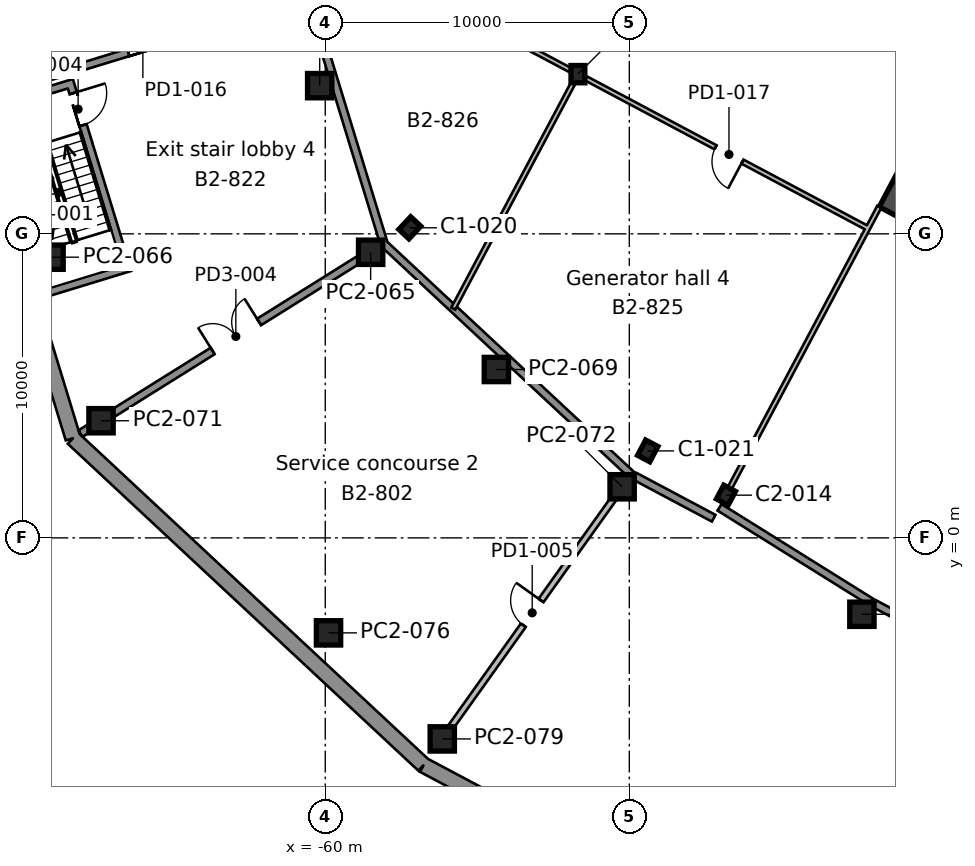
"""IFC4 building model, lengths in metres.
Left out: names, types, materials, properties, quantities, classifications, styles, units other than length and angle.
Written with IfcOpenShell. Run it as: python <this file> out.ifc"""

import sys

from ifc_helpers import new_model, si_unit, direction, frame, frame_2d, origin, origin_2d, place, context, subcontext, project, spatial, rectangle, i_section, extrude, element, fill, save


model = new_model("IFC4")
c1 = context("Model", 3, precision=1e-05, world=origin(), true_north=direction((0.0, 1.0)))
c2 = subcontext(c1, "Body", "Model", "MODEL_VIEW")
j1 = project(units=[si_unit("LENGTHUNIT", "METRE"), si_unit("PLANEANGLEUNIT", "RADIAN")], contexts=[c1])
p1 = place(None, origin())
s1 = spatial("IfcSite", under=j1, at=p1, CompositionType="ELEMENT")
p2 = place(p1, origin())
s2 = spatial("IfcBuilding", under=s1, at=p2, CompositionType="ELEMENT")
p3 = place(p2, frame((0.0, 0.0, -9.0)))
s3 = spatial("IfcBuildingStorey", under=s2, at=p3, CompositionType="ELEMENT", Elevation=-9.0)
p4 = place(p3, frame((-46.821, 1.405, 0.0), z_axis=(0.0, 0.0, 1.0), x_axis=(0.882947592859, -0.469471562786, 0.0)))
e1 = element("IfcColumn", 1, at=p4, inside=s3, PredefinedType="COLUMN", context=c2, shape_type="SweptSolid", body=[
    extrude(i_section(OverallWidth=0.437, OverallDepth=0.513, WebThickness=0.061, FlangeThickness=0.097, FilletRadius=0.015, at=origin_2d()), origin(), (0.0, 0.0, 1.0), 4.5),
])
for number, where, z_axis, x_axis in (
    (2, (-49.394, 2.861, 0.0), (0.0, 0.0, 1.0), (0.883, -0.469, 0.0)),
    (3, (-57.219, 10.199, 0.0), (0.0, 0.0, 1.0), (0.731, -0.682, 0.0)),
    (4, (-51.69, 15.252, 0.0), (0.0, 0.0, 1.0), (1.0, 0.0, 0.0)),
):
    element("IfcColumn", number, at=place(p3, frame(where, z_axis=z_axis, x_axis=x_axis)), inside=s3, PredefinedType="COLUMN", context=c2, shape_type="SweptSolid", body=[
        extrude(i_section(OverallWidth=0.455, OverallDepth=0.569, WebThickness=0.078, FlangeThickness=0.125, FilletRadius=0.015, at=origin_2d()), origin(), (0.0, 0.0, 1.0), 4.5),
    ])
p5 = place(p3, frame((-31.992, 28.336, 0.0), z_axis=(0.0, 0.0, 1.0), x_axis=(-0.46947084998, -0.882947971864, 0.0)))
e5 = element("IfcWall", 5, at=p5, inside=s3, PredefinedType="SHEAR", context=c2, shape_type="SweptSolid", body=[
    extrude(rectangle(XDim=20.0, YDim=0.9, at=frame_2d((10.0, 0.0))), origin(), (0.0, 0.0, 1.0), 4.5),
])
p6 = place(p5, frame((10.6, 0.0, 0.0)))
e6 = element("IfcOpeningElement", 6, at=p6, cuts=e5, PredefinedType="OPENING", context=c2, shape_type="SweptSolid", body=[
    extrude(rectangle(XDim=2.4, YDim=2.4, at=frame_2d((1.2, 1.2))), frame((0.0, 0.46, 0.0), z_axis=(0.0, -1.0, 0.0), x_axis=(1.0, 0.0, 0.0)), (0.0, 0.0, 1.0), 0.92),
])
p7 = place(p3, frame((-73.394, 19.951, 0.0), z_axis=(0.0, 0.0, 1.0), x_axis=(0.292377196349, -0.956303076987, 0.0)))
e7 = element("IfcWall", 7, at=p7, inside=s3, PredefinedType="SOLIDWALL", context=c2, shape_type="SweptSolid", body=[
    extrude(rectangle(XDim=17.435, YDim=0.5, at=frame_2d((8.718, 0.0))), origin(), (0.0, 0.0, 1.0), 4.5),
])
p8 = place(p3, frame((-68.297, 3.277, 0.0), z_axis=(0.0, 0.0, 1.0), x_axis=(0.73135285176, -0.681999271424, 0.0)))
e8 = element("IfcWall", 8, at=p8, inside=s3, PredefinedType="SOLIDWALL", context=c2, shape_type="SweptSolid", body=[
    extrude(rectangle(XDim=15.765, YDim=0.5, at=frame_2d((7.883, 0.0))), origin(), (0.0, 0.0, 1.0), 4.5),
])
p9 = place(p3, frame((-56.767, -7.475, 0.0), z_axis=(0.0, 0.0, 1.0), x_axis=(0.882947974138, -0.469470845703, 0.0)))
e9 = element("IfcWall", 9, at=p9, inside=s3, PredefinedType="SOLIDWALL", context=c2, shape_type="SweptSolid", body=[
    extrude(rectangle(XDim=57.833, YDim=0.5, at=frame_2d((28.917, 0.0))), origin(), (0.0, 0.0, 1.0), 4.5),
])
for number, where, z_axis, x_axis in (
    (10, (-56.152, -6.612, 0.0), (0.0, 0.0, 1.0), (1.0, 0.0, 0.0)),
    (11, (-59.893, -3.124, 0.0), (0.0, 0.0, 1.0), (1.0, 0.0, 0.0)),
    (12, (-42.35, -2.512, 0.0), (0.0, 0.0, 1.0), (1.0, 0.0, 0.0)),
    (13, (-50.236, 1.681, 0.0), (0.0, 0.0, 1.0), (1.0, 0.0, 0.0)),
    (14, (-67.375, 3.853, 0.0), (0.0, 0.0, 1.0), (1.0, 0.0, 0.0)),
    (15, (-54.372, 5.538, 0.0), (0.0, 0.0, 1.0), (1.0, 0.0, 0.0)),
    (16, (-69.019, 9.232, 0.0), (0.0, 0.0, 1.0), (1.0, 0.0, 0.0)),
    (17, (-58.507, 9.394, 0.0), (0.0, 0.0, 1.0), (1.0, 0.0, 0.0)),
    (18, (-60.183, 14.874, 0.0), (0.0, 0.0, 1.0), (1.0, 0.0, 0.0)),
):
    element("IfcColumn", number, at=place(p3, frame(where, z_axis=z_axis, x_axis=x_axis)), inside=s3, PredefinedType="COLUMN", context=c2, shape_type="SweptSolid", body=[
        extrude(rectangle(XDim=0.8, YDim=0.8, at=origin_2d()), origin(), (0.0, 0.0, 1.0), 4.1),
    ])
p10 = place(p3, frame((-71.449, 14.445, 0.0), z_axis=(0.0, 0.0, 1.0), x_axis=(0.956305341867, 0.292369788309, 0.0)))
e19 = element("IfcWall", 19, at=p10, inside=s3, PredefinedType="SOLIDWALL", context=c2, shape_type="SweptSolid", body=[
    extrude(rectangle(XDim=11.4, YDim=0.25, at=frame_2d((5.7, 0.0))), origin(), (0.0, 0.0, 1.0), 4.1),
])
p11 = place(p10, frame((5.2, 0.0, 0.0)))
e20 = element("IfcOpeningElement", 20, at=p11, cuts=e19, PredefinedType="OPENING", context=c2, shape_type="SweptSolid", body=[
    extrude(rectangle(XDim=1.0, YDim=2.1, at=frame_2d((0.5, 1.05))), frame((0.0, 0.135, 0.0), z_axis=(0.0, -1.0, 0.0), x_axis=(1.0, 0.0, 0.0)), (0.0, 0.0, 1.0), 0.27),
])
p12 = place(p3, frame((-58.065, 9.666, 0.0), z_axis=(0.0, 0.0, 1.0), x_axis=(-0.292613894095, 0.956230677704, 0.0)))
e21 = element("IfcWall", 21, at=p12, inside=s3, PredefinedType="SOLIDWALL", context=c2, shape_type="SweptSolid", body=[
    extrude(rectangle(XDim=8.487, YDim=0.25, at=frame_2d((4.244, 0.0))), origin(), (0.0, 0.0, 1.0), 4.1),
])
p13 = place(p3, frame((-68.052, 3.43, 0.0), z_axis=(0.0, 0.0, 1.0), x_axis=(0.847914279888, 0.530133354886, 0.0)))
e22 = element("IfcWall", 22, at=p13, inside=s3, PredefinedType="SOLIDWALL", context=c2, shape_type="SweptSolid", body=[
    extrude(rectangle(XDim=0.326, YDim=0.25, at=frame_2d((0.163, 0.0))), origin(), (0.0, 0.0, 1.0), 4.1),
])
p14 = place(p3, frame((-66.975, 4.103, 0.0), z_axis=(0.0, 0.0, 1.0), x_axis=(0.848048758951, 0.529918203539, 0.0)))
e23 = element("IfcWall", 23, at=p14, inside=s3, PredefinedType="SOLIDWALL", context=c2, shape_type="SweptSolid", body=[
    extrude(rectangle(XDim=9.514, YDim=0.25, at=frame_2d((4.757, 0.0))), origin(), (0.0, 0.0, 1.0), 4.1),
])
p15 = place(p14, frame((3.857, 0.0, 0.0)))
e24 = element("IfcOpeningElement", 24, at=p15, cuts=e23, PredefinedType="OPENING", context=c2, shape_type="SweptSolid", body=[
    extrude(rectangle(XDim=1.8, YDim=2.1, at=frame_2d((0.9, 1.05))), frame((0.0, 0.135, 0.0), z_axis=(0.0, -1.0, 0.0), x_axis=(1.0, 0.0, 0.0)), (0.0, 0.0, 1.0), 0.27),
])
p16 = place(p3, frame((-47.224, 0.646, 0.0), z_axis=(0.0, 0.0, 1.0), x_axis=(-0.882766080441, 0.469812778905, 0.0)))
e25 = element("IfcWall", 25, at=p16, inside=s3, PredefinedType="SOLIDWALL", context=c2, shape_type="SweptSolid", body=[
    extrude(rectangle(XDim=2.958, YDim=0.25, at=frame_2d((1.479, 0.0))), origin(), (0.0, 0.0, 1.0), 4.1),
])
p17 = place(p3, frame((-34.153, -6.304, 0.0), z_axis=(0.0, 0.0, 1.0), x_axis=(-0.882943838539, 0.469478623567, 0.0)))
e26 = element("IfcWall", 26, at=p17, inside=s3, PredefinedType="SOLIDWALL", context=c2, shape_type="SweptSolid", body=[
    extrude(rectangle(XDim=8.831, YDim=0.25, at=frame_2d((4.415, 0.0))), origin(), (0.0, 0.0, 1.0), 4.1),
])
p18 = place(p3, frame((-42.037, -2.112, 0.0), z_axis=(0.0, 0.0, 1.0), x_axis=(-0.848449825707, 0.529275819642, 0.0)))
e27 = element("IfcWall", 27, at=p18, inside=s3, PredefinedType="SOLIDWALL", context=c2, shape_type="SweptSolid", body=[
    extrude(rectangle(XDim=5.889, YDim=0.25, at=frame_2d((2.945, 0.0))), origin(), (0.0, 0.0, 1.0), 4.1),
])
p19 = place(p3, frame((-50.521, 1.281, 0.0), z_axis=(0.0, 0.0, 1.0), x_axis=(-0.580708624763, -0.814111474631, 0.0)))
e28 = element("IfcWall", 28, at=p19, inside=s3, PredefinedType="PARTITIONING", context=c2, shape_type="SweptSolid", body=[
    extrude(rectangle(XDim=9.204, YDim=0.2, at=frame_2d((4.602, 0.0))), origin(), (0.0, 0.0, 1.0), 4.1),
])
p20 = place(p19, frame((4.102, 0.0, 0.0)))
e29 = element("IfcOpeningElement", 29, at=p20, cuts=e28, PredefinedType="OPENING", context=c2, shape_type="SweptSolid", body=[
    extrude(rectangle(XDim=1.0, YDim=2.1, at=frame_2d((0.5, 1.05))), frame((0.0, 0.11, 0.0), z_axis=(0.0, -1.0, 0.0), x_axis=(1.0, 0.0, 0.0)), (0.0, 0.0, 1.0), 0.22),
])
p21 = place(p3, frame((-51.427, 15.113, 0.0), z_axis=(0.0, 0.0, 1.0), x_axis=(0.882942303397, -0.469481510681, 0.0)))
e30 = element("IfcWall", 30, at=p21, inside=s3, PredefinedType="PARTITIONING", context=c2, shape_type="SweptSolid", body=[
    extrude(rectangle(XDim=10.503, YDim=0.15, at=frame_2d((5.251, 0.0))), origin(), (0.0, 0.0, 1.0), 4.1),
])
p22 = place(p21, frame((4.83, 0.0, 0.0)))
e31 = element("IfcOpeningElement", 31, at=p22, cuts=e30, PredefinedType="OPENING", context=c2, shape_type="SweptSolid", body=[
    extrude(rectangle(XDim=1.0, YDim=2.1, at=frame_2d((0.5, 1.05))), frame((0.0, 0.085, 0.0), z_axis=(0.0, -1.0, 0.0), x_axis=(1.0, 0.0, 0.0)), (0.0, 0.0, 1.0), 0.17),
])
p23 = place(p3, frame((-60.632, 20.007, 0.0), z_axis=(0.0, 0.0, 1.0), x_axis=(0.882940733586, -0.469484462975, 0.0)))
e32 = element("IfcWall", 32, at=p23, inside=s3, PredefinedType="PARTITIONING", context=c2, shape_type="SweptSolid", body=[
    extrude(rectangle(XDim=9.83, YDim=0.15, at=frame_2d((4.915, 0.0))), origin(), (0.0, 0.0, 1.0), 4.1),
])
p24 = place(p23, frame((4.337, 0.0, 0.0)))
e33 = element("IfcOpeningElement", 33, at=p24, cuts=e32, PredefinedType="OPENING", context=c2, shape_type="SweptSolid", body=[
    extrude(rectangle(XDim=1.0, YDim=2.1, at=frame_2d((0.5, 1.05))), frame((0.0, 0.085, 0.0), z_axis=(0.0, -1.0, 0.0), x_axis=(1.0, 0.0, 0.0)), (0.0, 0.0, 1.0), 0.17),
])
p25 = place(p3, frame((-42.151, 10.187, 0.0), z_axis=(0.0, 0.0, 1.0), x_axis=(0.469582372655, 0.882888665287, 0.0)))
e34 = element("IfcWall", 34, at=p25, inside=s3, PredefinedType="PARTITIONING", context=c2, shape_type="SweptSolid", body=[
    extrude(rectangle(XDim=0.794, YDim=0.15, at=frame_2d((0.397, 0.0))), origin(), (0.0, 0.0, 1.0), 4.1),
])
p26 = place(p3, frame((-51.858, 14.936, 0.0), z_axis=(0.0, 0.0, 1.0), x_axis=(-0.469478534594, -0.882943885848, 0.0)))
e35 = element("IfcWall", 35, at=p26, inside=s3, PredefinedType="PARTITIONING", context=c2, shape_type="SweptSolid", body=[
    extrude(rectangle(XDim=8.373, YDim=0.15, at=frame_2d((4.187, 0.0))), origin(), (0.0, 0.0, 1.0), 4.1),
])
p27 = place(p3, frame((-46.7, 1.632, 0.0), z_axis=(0.0, 0.0, 1.0), x_axis=(0.46948131983, 0.882942404878, 0.0)))
e36 = element("IfcWall", 36, at=p27, inside=s3, PredefinedType="PARTITIONING", context=c2, shape_type="SweptSolid", body=[
    extrude(rectangle(XDim=9.688, YDim=0.15, at=frame_2d((4.844, 0.0))), origin(), (0.0, 0.0, 1.0), 4.1),
])
p28 = place(p3, frame((-55.785, 7.539, 0.0), z_axis=(0.0, 0.0, 1.0), x_axis=(0.731373339026, -0.681977300914, 0.0)))
e37 = element("IfcWall", 37, at=p28, inside=s3, PredefinedType="SOLIDWALL", context=c2, shape_type="SweptSolid", body=[
    extrude(rectangle(XDim=2.348, YDim=0.25, at=frame_2d((1.174, 0.0))), origin(), (0.0, 0.0, 1.0), 4.1),
])
p29 = place(p3, frame((-53.972, 5.849, 0.0), z_axis=(0.0, 0.0, 1.0), x_axis=(0.731317536597, -0.682037140239, 0.0)))
e38 = element("IfcWall", 38, at=p29, inside=s3, PredefinedType="SOLIDWALL", context=c2, shape_type="SweptSolid", body=[
    extrude(rectangle(XDim=5.509, YDim=0.25, at=frame_2d((2.754, 0.0))), origin(), (0.0, 0.0, 1.0), 4.1),
])
p30 = place(p3, frame((-58.068, 9.669, 0.0), z_axis=(0.0, 0.0, 1.0), x_axis=(0.731356961262, -0.681994864507, 0.0)))
e39 = element("IfcWall", 39, at=p30, inside=s3, PredefinedType="SOLIDWALL", context=c2, shape_type="SweptSolid", body=[
    extrude(rectangle(XDim=3.121, YDim=0.25, at=frame_2d((1.561, 0.0))), origin(), (0.0, 0.0, 1.0), 4.1),
])
for number, where, z_axis, x_axis in (
    (40, (-70.943, 14.155, 0.0), (0.0, 0.0, 1.0), (0.956, 0.292, 0.0)),
    (41, (-69.086, 8.083, 0.0), (0.0, 0.0, 1.0), (0.956, 0.292, 0.0)),
):
    element("IfcWall", number, at=place(p3, frame(where, z_axis=z_axis, x_axis=x_axis)), inside=s3, PredefinedType="SOLIDWALL", context=c2, shape_type="SweptSolid", body=[
        extrude(rectangle(XDim=2.8, YDim=0.25, at=frame_2d((1.4, 0.0))), origin(), (0.0, 0.0, 1.0), 4.1),
    ])
p31 = place(p3, frame((-68.421, 15.057, 0.0), z_axis=(0.0, 0.0, 1.0), x_axis=(0.292369833763, -0.956305327971, 0.0)))
e42 = element("IfcWall", 42, at=p31, inside=s3, PredefinedType="SOLIDWALL", context=c2, shape_type="SweptSolid", body=[
    extrude(rectangle(XDim=6.6, YDim=0.25, at=frame_2d((3.3, 0.0))), origin(), (0.0, 0.0, 1.0), 4.1),
])
p32 = place(p31, frame((0.45, 0.0, 0.0)))
e43 = element("IfcOpeningElement", 43, at=p32, cuts=e42, PredefinedType="OPENING", context=c2, shape_type="SweptSolid", body=[
    extrude(rectangle(XDim=1.1, YDim=2.1, at=frame_2d((0.55, 1.05))), frame((0.0, 0.135, 0.0), z_axis=(0.0, -1.0, 0.0), x_axis=(1.0, 0.0, 0.0)), (0.0, 0.0, 1.0), 0.27),
])
p33 = place(p32, origin())
e44 = element("IfcDoor", 44, at=p33, inside=s3, OperationType="SINGLE_SWING_LEFT", PredefinedType="DOOR", context=c2, shape_type="SweptSolid", body=[
    extrude(rectangle(XDim=1.1, YDim=2.1, at=frame_2d((0.55, 1.05))), frame((0.0, 0.025, 0.0), z_axis=(0.0, -1.0, 0.0), x_axis=(1.0, 0.0, 0.0)), (0.0, 0.0, 1.0), 0.05),
])
fill(e43, e44)
p34 = place(p22, frame((1.0, 0.0, 0.0), z_axis=(0.0, 0.0, 1.0), x_axis=(-1.0, 0.0, 0.0)))
e45 = element("IfcDoor", 45, at=p34, inside=s3, OperationType="SINGLE_SWING_LEFT", PredefinedType="DOOR", context=c2, shape_type="SweptSolid", body=[
    extrude(rectangle(XDim=1.0, YDim=2.1, at=frame_2d((0.5, 1.05))), frame((0.0, 0.025, 0.0), z_axis=(0.0, -1.0, 0.0), x_axis=(1.0, 0.0, 0.0)), (0.0, 0.0, 1.0), 0.05),
])
fill(e31, e45)
p35 = place(p15, origin())
e46 = element("IfcDoor", 46, at=p35, inside=s3, OperationType="DOUBLE_DOOR_SINGLE_SWING", PredefinedType="DOOR", context=c2, shape_type="SweptSolid", body=[
    extrude(rectangle(XDim=1.8, YDim=2.1, at=frame_2d((0.9, 1.05))), frame((0.0, 0.025, 0.0), z_axis=(0.0, -1.0, 0.0), x_axis=(1.0, 0.0, 0.0)), (0.0, 0.0, 1.0), 0.05),
])
fill(e24, e46)
p36 = place(p20, frame((1.0, 0.0, 0.0), z_axis=(0.0, 0.0, 1.0), x_axis=(-1.0, 0.0, 0.0)))
e47 = element("IfcDoor", 47, at=p36, inside=s3, OperationType="SINGLE_SWING_RIGHT", PredefinedType="DOOR", context=c2, shape_type="SweptSolid", body=[
    extrude(rectangle(XDim=1.0, YDim=2.1, at=frame_2d((0.5, 1.05))), frame((0.0, 0.025, 0.0), z_axis=(0.0, -1.0, 0.0), x_axis=(1.0, 0.0, 0.0)), (0.0, 0.0, 1.0), 0.05),
])
fill(e29, e47)
p37 = place(p11, origin())
e48 = element("IfcDoor", 48, at=p37, inside=s3, OperationType="SINGLE_SWING_RIGHT", PredefinedType="DOOR", context=c2, shape_type="SweptSolid", body=[
    extrude(rectangle(XDim=1.0, YDim=2.1, at=frame_2d((0.5, 1.05))), frame((0.0, 0.025, 0.0), z_axis=(0.0, -1.0, 0.0), x_axis=(1.0, 0.0, 0.0)), (0.0, 0.0, 1.0), 0.05),
])
fill(e20, e48)
save(model, sys.argv[1])
